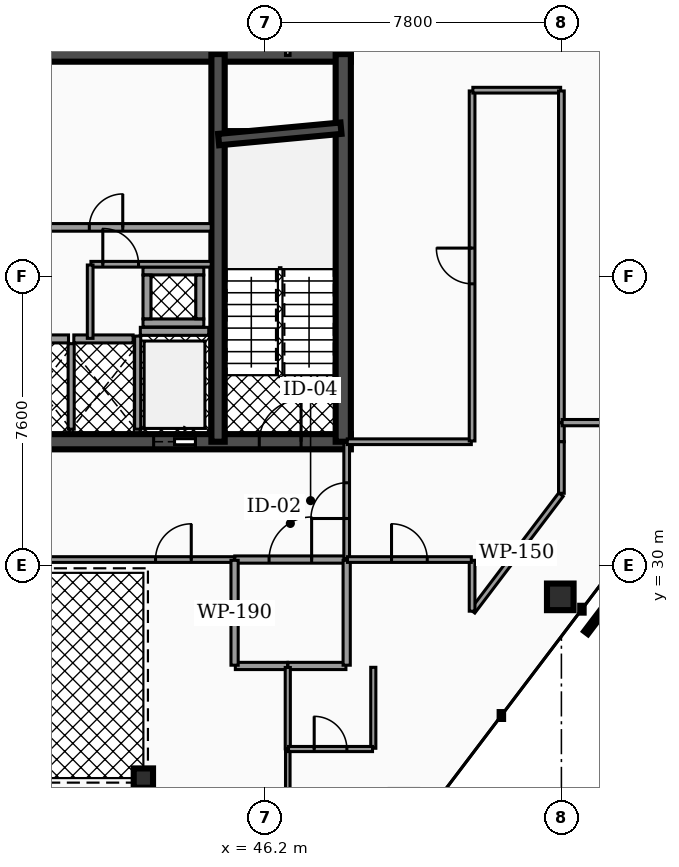
"""IFC4 building model, lengths in metres.
Left out: names, types, materials, properties, quantities, classifications, styles, units other than length and angle.
Written with IfcOpenShell. Run it as: python <this file> out.ifc"""

import sys

from ifc_helpers import new_model, si_unit, direction, frame, frame_2d, origin, origin_2d, place, context, subcontext, project, spatial, rectangle, hollow_rectangle, hollow_circle, extrude, element, fill, save


model = new_model("IFC4")
c1 = context("Model", 3, precision=1e-05, world=origin(), true_north=direction((0.0, 1.0)))
c2 = subcontext(c1, "Body", "Model", "MODEL_VIEW")
j1 = project(units=[si_unit("LENGTHUNIT", "METRE"), si_unit("PLANEANGLEUNIT", "RADIAN")], contexts=[c1])
p1 = place(None, origin())
s1 = spatial("IfcSite", under=j1, at=p1, CompositionType="ELEMENT")
p2 = place(p1, origin())
s2 = spatial("IfcBuilding", under=s1, at=p2, CompositionType="ELEMENT")
p3 = place(p2, frame((0.0, 0.0, 172.04)))
s3 = spatial("IfcBuildingStorey", under=s2, at=p3, CompositionType="ELEMENT", Elevation=172.04)
p4 = place(p3, frame((28.4, 43.45, 0.0), z_axis=(0.0, 0.0, 1.0), x_axis=(1.0, 0.0, 0.0)))
e1 = element("IfcWall", 1, at=p4, inside=s3, PredefinedType="SHEAR", context=c2, shape_type="SweptSolid", body=[
    extrude(rectangle(XDim=20.06, YDim=0.4, at=frame_2d((10.03, 0.0))), origin(), (0.0, 0.0, 1.0), 3.5),
])
p5 = place(p3, frame((28.4, 33.25, 0.0), z_axis=(0.0, 0.0, 1.0), x_axis=(1.0, 0.0, 0.0)))
e2 = element("IfcWall", 2, at=p5, inside=s3, PredefinedType="SHEAR", context=c2, shape_type="SweptSolid", body=[
    extrude(rectangle(XDim=20.06, YDim=0.4, at=frame_2d((10.03, 0.0))), origin(), (0.0, 0.0, 1.0), 3.5),
])
p6 = place(p5, frame((4.03, 0.0, 0.0)))
e3 = element("IfcOpeningElement", 3, at=p6, cuts=e2, PredefinedType="OPENING", context=c2, shape_type="SweptSolid", body=[
    extrude(rectangle(XDim=1.1, YDim=2.15, at=frame_2d((0.55, 1.075))), frame((0.0, 0.21, 0.0), z_axis=(0.0, -1.0, 0.0), x_axis=(1.0, 0.0, 0.0)), (0.0, 0.0, 1.0), 0.42),
])
p7 = place(p5, frame((14.87, 0.0, 0.0)))
e4 = element("IfcOpeningElement", 4, at=p7, cuts=e2, PredefinedType="OPENING", context=c2, shape_type="SweptSolid", body=[
    extrude(rectangle(XDim=1.1, YDim=2.15, at=frame_2d((0.55, 1.075))), frame((0.0, 0.21, 0.0), z_axis=(0.0, -1.0, 0.0), x_axis=(1.0, 0.0, 0.0)), (0.0, 0.0, 1.0), 0.42),
])
p8 = place(p5, frame((5.95, 0.0, 0.0)))
e5 = element("IfcOpeningElement", 5, at=p8, cuts=e2, PredefinedType="OPENING", context=c2, shape_type="SweptSolid", body=[
    extrude(rectangle(XDim=1.0, YDim=2.1, at=frame_2d((0.5, 1.05))), frame((0.0, 0.21, 0.0), z_axis=(0.0, -1.0, 0.0), x_axis=(1.0, 0.0, 0.0)), (0.0, 0.0, 1.0), 0.42),
])
p9 = place(p5, frame((7.65, 0.0, 0.0)))
e6 = element("IfcOpeningElement", 6, at=p9, cuts=e2, PredefinedType="OPENING", context=c2, shape_type="SweptSolid", body=[
    extrude(rectangle(XDim=1.0, YDim=2.1, at=frame_2d((0.5, 1.05))), frame((0.0, 0.21, 0.0), z_axis=(0.0, -1.0, 0.0), x_axis=(1.0, 0.0, 0.0)), (0.0, 0.0, 1.0), 0.42),
])
p10 = place(p5, frame((1.31, 0.0, 0.0)))
e7 = element("IfcOpeningElement", 7, at=p10, cuts=e2, PredefinedType="OPENING", context=c2, shape_type="SweptSolid", body=[
    extrude(rectangle(XDim=1.1, YDim=2.2, at=frame_2d((0.55, 1.1))), frame((0.0, 0.21, 0.0), z_axis=(0.0, -1.0, 0.0), x_axis=(1.0, 0.0, 0.0)), (0.0, 0.0, 1.0), 0.42),
])
p11 = place(p5, frame((9.44, 0.0, 0.0)))
e8 = element("IfcOpeningElement", 8, at=p11, cuts=e2, PredefinedType="OPENING", context=c2, shape_type="SweptSolid", body=[
    extrude(rectangle(XDim=1.12, YDim=2.05, at=frame_2d((0.56, 1.025))), frame((0.0, 0.21, 0.0), z_axis=(0.0, -1.0, 0.0), x_axis=(1.0, 0.0, 0.0)), (0.0, 0.0, 1.0), 0.42),
])
p12 = place(p5, frame((17.65, 0.0, 0.0)))
e9 = element("IfcOpeningElement", 9, at=p12, cuts=e2, PredefinedType="OPENING", context=c2, shape_type="SweptSolid", body=[
    extrude(rectangle(XDim=1.1, YDim=2.2, at=frame_2d((0.55, 1.1))), frame((0.0, 0.21, 0.0), z_axis=(0.0, -1.0, 0.0), x_axis=(1.0, 0.0, 0.0)), (0.0, 0.0, 1.0), 0.42),
])
p13 = place(p3, frame((44.965, 33.25, 0.0), z_axis=(0.0, 0.0, 1.0), x_axis=(0.0, 1.0, 0.0)))
e10 = element("IfcWall", 10, at=p13, inside=s3, PredefinedType="SHEAR", context=c2, shape_type="SweptSolid", body=[
    extrude(rectangle(XDim=10.2, YDim=0.35, at=frame_2d((5.1, 0.0))), origin(), (0.0, 0.0, 1.0), 3.5),
])
p14 = place(p3, frame((48.26, 33.25, 0.0), z_axis=(0.0, 0.0, 1.0), x_axis=(0.0, 1.0, 0.0)))
e11 = element("IfcWall", 11, at=p14, inside=s3, PredefinedType="SHEAR", context=c2, shape_type="SweptSolid", body=[
    extrude(rectangle(XDim=10.2, YDim=0.4, at=frame_2d((5.1, 0.0))), origin(), (0.0, 0.0, 1.0), 3.5),
])
p15 = place(p3, frame((44.98, 41.2, 0.0), z_axis=(0.0, 0.0, 1.0), x_axis=(0.995686468965, 0.09278176286, 0.0)))
e12 = element("IfcWall", 12, at=p15, inside=s3, PredefinedType="SHEAR", context=c2, shape_type="SweptSolid", body=[
    extrude(rectangle(XDim=3.234, YDim=0.3, at=frame_2d((1.617, 0.0))), origin(), (0.0, 0.0, 1.0), 3.5),
])
p16 = place(p3, frame((53.971, 29.168, 0.0), z_axis=(-0.036709016381, 0.03817180451, 0.998596696097), x_axis=(-0.72078251354, -0.693161285831, 0.0)))
e13 = element("IfcColumn", 13, at=p16, inside=s3, PredefinedType="COLUMN", context=c2, shape_type="SweptSolid", body=[
    extrude(hollow_rectangle(XDim=0.7, YDim=0.7, WallThickness=0.035, at=origin_2d()), origin(), (0.0, 0.0, 1.0), 3.505),
])
p17 = place(p3, frame((43.0, 24.4, 0.0), z_axis=(0.0, 0.0, 1.0), x_axis=(1.0, 0.0, 0.0)))
e14 = element("IfcColumn", 14, at=p17, inside=s3, PredefinedType="COLUMN", context=c2, shape_type="SweptSolid", body=[
    extrude(hollow_circle(Radius=0.254, WallThickness=0.02, at=origin_2d()), origin(), (0.0, 0.0, 1.0), 3.5),
])
p18 = place(p3, frame((42.92, 36.155, 0.0), z_axis=(0.0, 0.0, 1.0), x_axis=(1.0, 0.0, 0.0)))
e15 = element("IfcWall", 15, at=p18, inside=s3, PredefinedType="SOLIDWALL", context=c2, shape_type="SweptSolid", body=[
    extrude(rectangle(XDim=1.8, YDim=0.21, at=frame_2d((0.9, 0.0))), origin(), (0.0, 0.0, 1.0), 2.472),
])
p19 = place(p3, frame((42.85, 33.58, 0.0), z_axis=(0.0, 0.0, 1.0), x_axis=(0.0, 1.0, 0.0)))
e16 = element("IfcWall", 16, at=p19, inside=s3, PredefinedType="SOLIDWALL", context=c2, shape_type="SweptSolid", body=[
    extrude(rectangle(XDim=2.45, YDim=0.16, at=frame_2d((1.225, 0.0))), origin(), (0.0, 0.0, 1.0), 2.472),
])
p20 = place(p3, frame((39.47, 35.955, 0.0), z_axis=(0.0, 0.0, 1.0), x_axis=(1.0, 0.0, 0.0)))
e17 = element("IfcWall", 17, at=p20, inside=s3, PredefinedType="SOLIDWALL", context=c2, shape_type="SweptSolid", body=[
    extrude(rectangle(XDim=1.56, YDim=0.21, at=frame_2d((0.78, 0.0))), origin(), (0.0, 0.0, 1.0), 2.472),
])
p21 = place(p3, frame((41.1, 33.58, 0.0), z_axis=(0.0, 0.0, 1.0), x_axis=(0.0, 1.0, 0.0)))
e18 = element("IfcWall", 18, at=p21, inside=s3, PredefinedType="SOLIDWALL", context=c2, shape_type="SweptSolid", body=[
    extrude(rectangle(XDim=2.25, YDim=0.16, at=frame_2d((1.125, 0.0))), origin(), (0.0, 0.0, 1.0), 2.472),
])
p22 = place(p3, frame((41.17, 35.955, 0.0), z_axis=(0.0, 0.0, 1.0), x_axis=(1.0, 0.0, 0.0)))
e19 = element("IfcWall", 19, at=p22, inside=s3, PredefinedType="SOLIDWALL", context=c2, shape_type="SweptSolid", body=[
    extrude(rectangle(XDim=1.56, YDim=0.21, at=frame_2d((0.78, 0.0))), origin(), (0.0, 0.0, 1.0), 2.472),
])
for number, where, z_axis, x_axis in (
    (20, (42.99, 36.375, 0.0), (0.0, 0.0, 1.0), (1.0, 0.0, 0.0)),
    (21, (42.99, 37.745, 0.0), (0.0, 0.0, 1.0), (1.0, 0.0, 0.0)),
):
    element("IfcWall", number, at=place(p3, frame(where, z_axis=z_axis, x_axis=x_axis)), inside=s3, PredefinedType="SOLIDWALL", context=c2, shape_type="SweptSolid", body=[
        extrude(rectangle(XDim=1.6, YDim=0.21, at=frame_2d((0.8, 0.0))), origin(), (0.0, 0.0, 1.0), 3.5),
    ])
for number, where, z_axis, x_axis in (
    (22, (43.095, 36.485, 0.0), (0.0, 0.0, 1.0), (0.0, 1.0, 0.0)),
    (23, (44.485, 36.485, 0.0), (0.0, 0.0, 1.0), (0.0, 1.0, 0.0)),
):
    element("IfcWall", number, at=place(p3, frame(where, z_axis=z_axis, x_axis=x_axis)), inside=s3, PredefinedType="SOLIDWALL", context=c2, shape_type="SweptSolid", body=[
        extrude(rectangle(XDim=1.15, YDim=0.21, at=frame_2d((0.575, 0.0))), origin(), (0.0, 0.0, 1.0), 3.5),
    ])
p23 = place(p3, frame((39.25, 38.89, 0.0), z_axis=(0.0, 0.0, 1.0), x_axis=(1.0, 0.0, 0.0)))
e24 = element("IfcWall", 24, at=p23, inside=s3, PredefinedType="PARTITIONING", context=c2, shape_type="SweptSolid", body=[
    extrude(rectangle(XDim=5.535, YDim=0.2, at=frame_2d((2.768, 0.0))), origin(), (0.0, 0.0, 1.0), 2.457),
])
p24 = place(p23, frame((2.327, 0.0, 0.0)))
e25 = element("IfcOpeningElement", 25, at=p24, cuts=e24, PredefinedType="OPENING", context=c2, shape_type="SweptSolid", body=[
    extrude(rectangle(XDim=0.88, YDim=2.05, at=frame_2d((0.44, 1.025))), frame((0.0, 0.11, 0.0), z_axis=(0.0, -1.0, 0.0), x_axis=(1.0, 0.0, 0.0)), (0.0, 0.0, 1.0), 0.22),
])
p25 = place(p3, frame((41.62, 37.92, 0.0), z_axis=(0.0, 0.0, 1.0), x_axis=(1.0, 0.0, 0.0)))
e26 = element("IfcWall", 26, at=p25, inside=s3, PredefinedType="PARTITIONING", context=c2, shape_type="SweptSolid", body=[
    extrude(rectangle(XDim=3.165, YDim=0.15, at=frame_2d((1.583, 0.0))), origin(), (0.0, 0.0, 1.0), 2.457),
])
p26 = place(p25, frame((0.312, 0.0, 0.0)))
e27 = element("IfcOpeningElement", 27, at=p26, cuts=e26, PredefinedType="OPENING", context=c2, shape_type="SweptSolid", body=[
    extrude(rectangle(XDim=0.94, YDim=2.05, at=frame_2d((0.47, 1.025))), frame((0.0, 0.085, 0.0), z_axis=(0.0, -1.0, 0.0), x_axis=(1.0, 0.0, 0.0)), (0.0, 0.0, 1.0), 0.17),
])
p27 = place(p3, frame((41.6, 35.97, 0.0), z_axis=(0.0, 0.0, 1.0), x_axis=(0.0, 1.0, 0.0)))
e28 = element("IfcWall", 28, at=p27, inside=s3, PredefinedType="PARTITIONING", context=c2, shape_type="SweptSolid", body=[
    extrude(rectangle(XDim=1.93, YDim=0.15, at=frame_2d((0.965, 0.0))), origin(), (0.0, 0.0, 1.0), 2.457),
])
p28 = place(p3, frame((45.405, 30.15, 0.0), z_axis=(0.0, 0.0, 1.0), x_axis=(1.0, 0.0, 0.0)))
e29 = element("IfcWall", 29, at=p28, inside=s3, PredefinedType="PARTITIONING", context=c2, shape_type="SweptSolid", body=[
    extrude(rectangle(XDim=2.925, YDim=0.19, at=frame_2d((1.462, 0.0))), origin(), (0.0, 0.0, 1.0), 2.457),
])
p29 = place(p28, frame((0.903, 0.0, 0.0)))
e30 = element("IfcOpeningElement", 30, at=p29, cuts=e29, PredefinedType="OPENING", context=c2, shape_type="SweptSolid", body=[
    extrude(rectangle(XDim=1.12, YDim=2.05, at=frame_2d((0.56, 1.025))), frame((0.0, 0.105, 0.0), z_axis=(0.0, -1.0, 0.0), x_axis=(1.0, 0.0, 0.0)), (0.0, 0.0, 1.0), 0.21),
])
p30 = place(p3, frame((48.35, 30.17, 0.0), z_axis=(0.0, 0.0, 1.0), x_axis=(0.0, 1.0, 0.0)))
e31 = element("IfcWall", 31, at=p30, inside=s3, PredefinedType="PARTITIONING", context=c2, shape_type="SweptSolid", body=[
    extrude(rectangle(XDim=3.06, YDim=0.15, at=frame_2d((1.53, 0.0))), origin(), (0.0, 0.0, 1.0), 2.457),
])
p31 = place(p30, frame((1.06, 0.0, 0.0)))
e32 = element("IfcOpeningElement", 32, at=p31, cuts=e31, PredefinedType="OPENING", context=c2, shape_type="SweptSolid", body=[
    extrude(rectangle(XDim=0.94, YDim=2.05, at=frame_2d((0.47, 1.025))), frame((0.0, 0.085, 0.0), z_axis=(0.0, -1.0, 0.0), x_axis=(1.0, 0.0, 0.0)), (0.0, 0.0, 1.0), 0.17),
])
p32 = place(p3, frame((35.385, 30.15, 0.0), z_axis=(0.0, 0.0, 1.0), x_axis=(1.0, 0.0, 0.0)))
e33 = element("IfcWall", 33, at=p32, inside=s3, PredefinedType="PARTITIONING", context=c2, shape_type="SweptSolid", body=[
    extrude(rectangle(XDim=10.01, YDim=0.15, at=frame_2d((5.005, 0.0))), origin(), (0.0, 0.0, 1.0), 2.457),
])
p33 = place(p32, frame((7.935, 0.0, 0.0)))
e34 = element("IfcOpeningElement", 34, at=p33, cuts=e33, PredefinedType="OPENING", context=c2, shape_type="SweptSolid", body=[
    extrude(rectangle(XDim=0.94, YDim=2.05, at=frame_2d((0.47, 1.025))), frame((0.0, 0.085, 0.0), z_axis=(0.0, -1.0, 0.0), x_axis=(1.0, 0.0, 0.0)), (0.0, 0.0, 1.0), 0.17),
])
p34 = place(p3, frame((45.42, 27.35, 0.0), z_axis=(0.0, 0.0, 1.0), x_axis=(1.0, 0.0, 0.0)))
e35 = element("IfcWall", 35, at=p34, inside=s3, PredefinedType="PARTITIONING", context=c2, shape_type="SweptSolid", body=[
    extrude(rectangle(XDim=1.375, YDim=0.19, at=frame_2d((0.688, 0.0))), origin(), (0.0, 0.0, 1.0), 2.457),
])
p35 = place(p3, frame((45.4, 27.37, 0.0), z_axis=(0.0, 0.0, 1.0), x_axis=(0.0, 1.0, 0.0)))
e36 = element("IfcWall", 36, at=p35, inside=s3, PredefinedType="PARTITIONING", context=c2, shape_type="SweptSolid", body=[
    extrude(rectangle(XDim=2.76, YDim=0.19, at=frame_2d((1.38, 0.0))), origin(), (0.0, 0.0, 1.0), 2.457),
])
p36 = place(p3, frame((46.805, 27.35, 0.0), z_axis=(0.0, 0.0, 1.0), x_axis=(1.0, 0.0, 0.0)))
e37 = element("IfcWall", 37, at=p36, inside=s3, PredefinedType="PARTITIONING", context=c2, shape_type="SweptSolid", body=[
    extrude(rectangle(XDim=1.525, YDim=0.19, at=frame_2d((0.763, 0.0))), origin(), (0.0, 0.0, 1.0), 2.457),
])
p37 = place(p3, frame((48.35, 27.37, 0.0), z_axis=(0.0, 0.0, 1.0), x_axis=(0.0, 1.0, 0.0)))
e38 = element("IfcWall", 38, at=p37, inside=s3, PredefinedType="PARTITIONING", context=c2, shape_type="SweptSolid", body=[
    extrude(rectangle(XDim=2.76, YDim=0.19, at=frame_2d((1.38, 0.0))), origin(), (0.0, 0.0, 1.0), 2.457),
])
p38 = place(p3, frame((54.0, 33.25, 0.0), z_axis=(0.0, 0.0, 1.0), x_axis=(0.0, 1.0, 0.0)))
e39 = element("IfcWall", 39, at=p38, inside=s3, PredefinedType="PARTITIONING", context=c2, shape_type="SweptSolid", body=[
    extrude(rectangle(XDim=0.498, YDim=0.15, at=frame_2d((0.249, 0.0))), origin(), (0.0, 0.0, 1.0), 2.457),
])
p39 = place(p3, frame((54.0, 31.894, 0.0), z_axis=(0.0, 0.0, 1.0), x_axis=(0.0, 1.0, 0.0)))
e40 = element("IfcWall", 40, at=p39, inside=s3, PredefinedType="PARTITIONING", context=c2, shape_type="SweptSolid", body=[
    extrude(rectangle(XDim=1.356, YDim=0.15, at=frame_2d((0.678, 0.0))), origin(), (0.0, 0.0, 1.0), 2.457),
])
p40 = place(p3, frame((51.662, 28.787, 0.0), z_axis=(0.0, 0.0, 1.0), x_axis=(0.603806431354, 0.797130976349, 0.0)))
e41 = element("IfcWall", 41, at=p40, inside=s3, PredefinedType="PARTITIONING", context=c2, shape_type="SweptSolid", body=[
    extrude(rectangle(XDim=3.852, YDim=0.15, at=frame_2d((1.926, 0.0))), origin(), (0.0, 0.0, 1.0), 2.457),
])
p41 = place(p3, frame((51.65, 28.792, 0.0), z_axis=(0.0, 0.0, 1.0), x_axis=(0.0, 1.0, 0.0)))
e42 = element("IfcWall", 42, at=p41, inside=s3, PredefinedType="PARTITIONING", context=c2, shape_type="SweptSolid", body=[
    extrude(rectangle(XDim=1.338, YDim=0.15, at=frame_2d((0.669, 0.0))), origin(), (0.0, 0.0, 1.0), 2.457),
])
p42 = place(p3, frame((48.37, 30.15, 0.0), z_axis=(0.0, 0.0, 1.0), x_axis=(1.0, 0.0, 0.0)))
e43 = element("IfcWall", 43, at=p42, inside=s3, PredefinedType="PARTITIONING", context=c2, shape_type="SweptSolid", body=[
    extrude(rectangle(XDim=3.26, YDim=0.15, at=frame_2d((1.63, 0.0))), origin(), (0.0, 0.0, 1.0), 2.457),
])
p43 = place(p42, frame((1.16, 0.0, 0.0)))
e44 = element("IfcOpeningElement", 44, at=p43, cuts=e43, PredefinedType="OPENING", context=c2, shape_type="SweptSolid", body=[
    extrude(rectangle(XDim=0.94, YDim=2.05, at=frame_2d((0.47, 1.025))), frame((0.0, 0.085, 0.0), z_axis=(0.0, -1.0, 0.0), x_axis=(1.0, 0.0, 0.0)), (0.0, 0.0, 1.0), 0.17),
])
p44 = place(p3, frame((48.365, 33.25, 0.0), z_axis=(0.0, 0.0, 1.0), x_axis=(1.0, 0.0, 0.0)))
e45 = element("IfcWall", 45, at=p44, inside=s3, PredefinedType="PARTITIONING", context=c2, shape_type="SweptSolid", body=[
    extrude(rectangle(XDim=3.265, YDim=0.15, at=frame_2d((1.632, 0.0))), origin(), (0.0, 0.0, 1.0), 2.457),
])
p45 = place(p3, frame((51.65, 33.27, 0.0), z_axis=(0.0, 0.0, 1.0), x_axis=(0.0, 1.0, 0.0)))
e46 = element("IfcWall", 46, at=p45, inside=s3, PredefinedType="PARTITIONING", context=c2, shape_type="SweptSolid", body=[
    extrude(rectangle(XDim=9.21, YDim=0.15, at=frame_2d((4.605, 0.0))), origin(), (0.0, 0.0, 1.0), 2.457),
])
p46 = place(p45, frame((4.135, 0.0, 0.0)))
e47 = element("IfcOpeningElement", 47, at=p46, cuts=e46, PredefinedType="OPENING", context=c2, shape_type="SweptSolid", body=[
    extrude(rectangle(XDim=0.94, YDim=2.05, at=frame_2d((0.47, 1.025))), frame((0.0, 0.085, 0.0), z_axis=(0.0, -1.0, 0.0), x_axis=(1.0, 0.0, 0.0)), (0.0, 0.0, 1.0), 0.17),
])
p47 = place(p3, frame((51.67, 42.5, 0.0), z_axis=(0.0, 0.0, 1.0), x_axis=(1.0, 0.0, 0.0)))
e48 = element("IfcWall", 48, at=p47, inside=s3, PredefinedType="PARTITIONING", context=c2, shape_type="SweptSolid", body=[
    extrude(rectangle(XDim=2.31, YDim=0.15, at=frame_2d((1.155, 0.0))), origin(), (0.0, 0.0, 1.0), 2.457),
])
p48 = place(p3, frame((54.0, 33.758, 0.0), z_axis=(0.0, 0.0, 1.0), x_axis=(0.0, 1.0, 0.0)))
e49 = element("IfcWall", 49, at=p48, inside=s3, PredefinedType="PARTITIONING", context=c2, shape_type="SweptSolid", body=[
    extrude(rectangle(XDim=8.722, YDim=0.15, at=frame_2d((4.361, 0.0))), origin(), (0.0, 0.0, 1.0), 2.457),
])
p49 = place(p3, frame((46.8, 23.932, 0.0), z_axis=(0.0, 0.0, 1.0), x_axis=(0.0, 1.0, 0.0)))
e50 = element("IfcWall", 50, at=p49, inside=s3, PredefinedType="PARTITIONING", context=c2, shape_type="SweptSolid", body=[
    extrude(rectangle(XDim=1.228, YDim=0.12, at=frame_2d((0.614, 0.0))), origin(), (0.0, 0.0, 1.0), 2.457),
])
p50 = place(p3, frame((46.8, 25.169, 0.0), z_axis=(0.0, 0.0, 1.0), x_axis=(0.0, 1.0, 0.0)))
e51 = element("IfcWall", 51, at=p50, inside=s3, PredefinedType="PARTITIONING", context=c2, shape_type="SweptSolid", body=[
    extrude(rectangle(XDim=2.14, YDim=0.135, at=frame_2d((1.07, 0.0))), origin(), (0.0, 0.0, 1.0), 2.457),
])
p51 = place(p3, frame((46.8, 43.415, 0.0), z_axis=(0.0, 0.0, 1.0), x_axis=(0.0, 1.0, 0.0)))
e52 = element("IfcWall", 52, at=p51, inside=s3, PredefinedType="PARTITIONING", context=c2, shape_type="SweptSolid", body=[
    extrude(rectangle(XDim=5.409, YDim=0.12, at=frame_2d((2.705, 0.0))), origin(), (0.0, 0.0, 1.0), 2.457),
])
p52 = place(p3, frame((49.05, 25.184, 0.0), z_axis=(0.0, 0.0, 1.0), x_axis=(0.0, 1.0, 0.0)))
e53 = element("IfcWall", 53, at=p52, inside=s3, PredefinedType="PARTITIONING", context=c2, shape_type="SweptSolid", body=[
    extrude(rectangle(XDim=2.13, YDim=0.135, at=frame_2d((1.065, 0.0))), origin(), (0.0, 0.0, 1.0), 2.457),
])
p53 = place(p3, frame((46.82, 25.164, 0.0), z_axis=(0.0, 0.0, 1.0), x_axis=(1.0, 0.0, 0.0)))
e54 = element("IfcWall", 54, at=p53, inside=s3, PredefinedType="PARTITIONING", context=c2, shape_type="SweptSolid", body=[
    extrude(rectangle(XDim=2.21, YDim=0.135, at=frame_2d((1.105, 0.0))), origin(), (0.0, 0.0, 1.0), 2.457),
])
p54 = place(p53, frame((0.675, 0.0, 0.0)))
e55 = element("IfcOpeningElement", 55, at=p54, cuts=e54, PredefinedType="OPENING", context=c2, shape_type="SweptSolid", body=[
    extrude(rectangle(XDim=0.86, YDim=2.05, at=frame_2d((0.43, 1.025))), frame((0.0, 0.077, 0.0), z_axis=(0.0, -1.0, 0.0), x_axis=(1.0, 0.0, 0.0)), (0.0, 0.0, 1.0), 0.155),
])
p55 = place(p3, frame((54.02, 33.753, 0.0), z_axis=(0.0, 0.0, 1.0), x_axis=(1.0, 0.0, 0.0)))
e56 = element("IfcWall", 56, at=p55, inside=s3, PredefinedType="PARTITIONING", context=c2, shape_type="SweptSolid", body=[
    extrude(rectangle(XDim=4.224, YDim=0.165, at=frame_2d((2.112, 0.0))), origin(), (0.0, 0.0, 1.0), 2.457),
])
p56 = place(p7, origin())
e57 = element("IfcDoor", 57, at=p56, inside=s3, OperationType="SLIDING_TO_RIGHT", PredefinedType="DOOR", context=c2, shape_type="SweptSolid", body=[
    extrude(rectangle(XDim=1.1, YDim=2.15, at=frame_2d((0.55, 1.075))), frame((0.0, 0.025, 0.0), z_axis=(0.0, -1.0, 0.0), x_axis=(1.0, 0.0, 0.0)), (0.0, 0.0, 1.0), 0.05),
])
fill(e4, e57)
p57 = place(p12, origin())
e58 = element("IfcDoor", 58, at=p57, inside=s3, OperationType="SINGLE_SWING_RIGHT", PredefinedType="DOOR", context=c2, shape_type="SweptSolid", body=[
    extrude(rectangle(XDim=1.1, YDim=2.2, at=frame_2d((0.55, 1.1))), frame((0.0, 0.025, 0.0), z_axis=(0.0, -1.0, 0.0), x_axis=(1.0, 0.0, 0.0)), (0.0, 0.0, 1.0), 0.05),
])
fill(e9, e58)
p58 = place(p24, origin())
e59 = element("IfcDoor", 59, at=p58, inside=s3, OperationType="SINGLE_SWING_RIGHT", PredefinedType="DOOR", context=c2, shape_type="SweptSolid", body=[
    extrude(rectangle(XDim=0.88, YDim=2.05, at=frame_2d((0.44, 1.025))), frame((0.0, 0.025, 0.0), z_axis=(0.0, -1.0, 0.0), x_axis=(1.0, 0.0, 0.0)), (0.0, 0.0, 1.0), 0.05),
])
fill(e25, e59)
p59 = place(p26, origin())
e60 = element("IfcDoor", 60, at=p59, inside=s3, OperationType="SINGLE_SWING_LEFT", PredefinedType="DOOR", context=c2, shape_type="SweptSolid", body=[
    extrude(rectangle(XDim=0.94, YDim=2.05, at=frame_2d((0.47, 1.025))), frame((0.0, 0.025, 0.0), z_axis=(0.0, -1.0, 0.0), x_axis=(1.0, 0.0, 0.0)), (0.0, 0.0, 1.0), 0.05),
])
fill(e27, e60)
p60 = place(p29, origin())
e61 = element("IfcDoor", 61, at=p60, inside=s3, OperationType="SINGLE_SWING_RIGHT", PredefinedType="DOOR", context=c2, shape_type="SweptSolid", body=[
    extrude(rectangle(XDim=1.12, YDim=2.05, at=frame_2d((0.56, 1.025))), frame((0.0, 0.025, 0.0), z_axis=(0.0, -1.0, 0.0), x_axis=(1.0, 0.0, 0.0)), (0.0, 0.0, 1.0), 0.05),
])
fill(e30, e61)
p61 = place(p31, origin())
e62 = element("IfcDoor", 62, at=p61, inside=s3, OperationType="SINGLE_SWING_LEFT", PredefinedType="DOOR", context=c2, shape_type="SweptSolid", body=[
    extrude(rectangle(XDim=0.94, YDim=2.05, at=frame_2d((0.47, 1.025))), frame((0.0, 0.025, 0.0), z_axis=(0.0, -1.0, 0.0), x_axis=(1.0, 0.0, 0.0)), (0.0, 0.0, 1.0), 0.05),
])
fill(e32, e62)
p62 = place(p33, origin())
e63 = element("IfcDoor", 63, at=p62, inside=s3, OperationType="SINGLE_SWING_RIGHT", PredefinedType="DOOR", context=c2, shape_type="SweptSolid", body=[
    extrude(rectangle(XDim=0.94, YDim=2.05, at=frame_2d((0.47, 1.025))), frame((0.0, 0.025, 0.0), z_axis=(0.0, -1.0, 0.0), x_axis=(1.0, 0.0, 0.0)), (0.0, 0.0, 1.0), 0.05),
])
fill(e34, e63)
p63 = place(p43, origin())
e64 = element("IfcDoor", 64, at=p63, inside=s3, OperationType="SINGLE_SWING_LEFT", PredefinedType="DOOR", context=c2, shape_type="SweptSolid", body=[
    extrude(rectangle(XDim=0.94, YDim=2.05, at=frame_2d((0.47, 1.025))), frame((0.0, 0.025, 0.0), z_axis=(0.0, -1.0, 0.0), x_axis=(1.0, 0.0, 0.0)), (0.0, 0.0, 1.0), 0.05),
])
fill(e44, e64)
p64 = place(p46, origin())
e65 = element("IfcDoor", 65, at=p64, inside=s3, OperationType="SINGLE_SWING_RIGHT", PredefinedType="DOOR", context=c2, shape_type="SweptSolid", body=[
    extrude(rectangle(XDim=0.94, YDim=2.05, at=frame_2d((0.47, 1.025))), frame((0.0, 0.025, 0.0), z_axis=(0.0, -1.0, 0.0), x_axis=(1.0, 0.0, 0.0)), (0.0, 0.0, 1.0), 0.05),
])
fill(e47, e65)
p65 = place(p54, origin())
e66 = element("IfcDoor", 66, at=p65, inside=s3, OperationType="SINGLE_SWING_LEFT", PredefinedType="DOOR", context=c2, shape_type="SweptSolid", body=[
    extrude(rectangle(XDim=0.86, YDim=2.05, at=frame_2d((0.43, 1.025))), frame((0.0, 0.025, 0.0), z_axis=(0.0, -1.0, 0.0), x_axis=(1.0, 0.0, 0.0)), (0.0, 0.0, 1.0), 0.05),
])
fill(e55, e66)
save(model, sys.argv[1])
